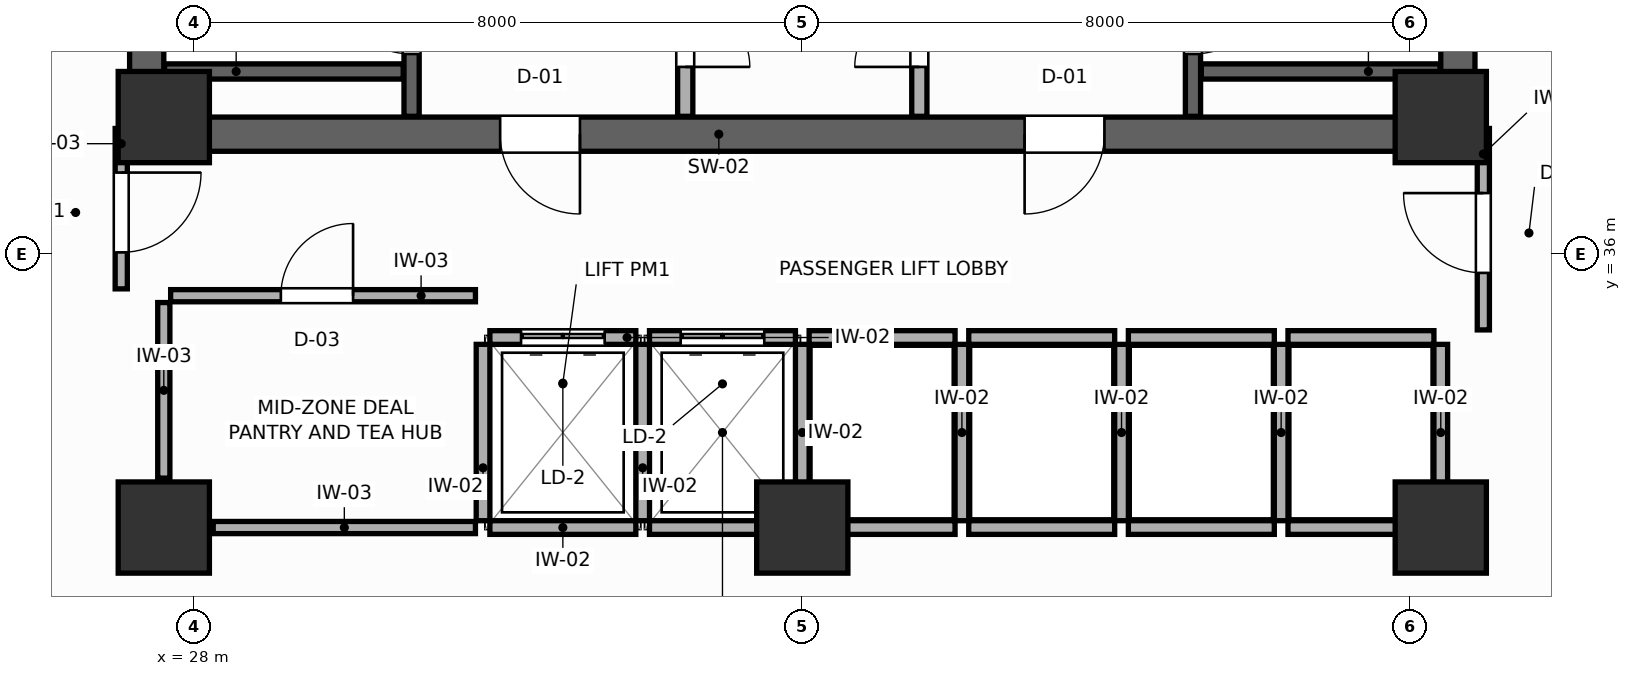
"""IFC4 building model, lengths in metres.
Left out: names, types, materials, properties, quantities, classifications, styles, units other than length and angle.
Written with IfcOpenShell. Run it as: python <this file> out.ifc"""

import sys

from ifc_helpers import new_model, si_unit, direction, frame, frame_2d, origin, origin_2d, place, context, subcontext, project, spatial, rectangle, extrude, source, transform, mapped, element, fill, save


model = new_model("IFC4")
c1 = context("Model", 3, precision=1e-05, world=origin(), true_north=direction((0.0, 1.0)))
c2 = subcontext(c1, "Body", "Model", "MODEL_VIEW")
j1 = project(units=[si_unit("LENGTHUNIT", "METRE"), si_unit("PLANEANGLEUNIT", "RADIAN")], contexts=[c1])
p1 = place(None, origin())
s1 = spatial("IfcSite", under=j1, at=p1, CompositionType="ELEMENT")
p2 = place(p1, origin())
s2 = spatial("IfcBuilding", under=s1, at=p2, CompositionType="ELEMENT")
p3 = place(p2, frame((0.0, 0.0, 120.6)))
s3 = spatial("IfcBuildingStorey", under=s2, at=p3, CompositionType="ELEMENT", Elevation=120.6)
p4 = place(p3, frame((27.15, 37.575, 0.0), z_axis=(0.0, 0.0, 1.0), x_axis=(1.0, 0.0, 0.0)))
e1 = element("IfcWall", 1, at=p4, inside=s3, PredefinedType="SHEAR", context=c2, shape_type="SweptSolid", body=[
    extrude(rectangle(XDim=17.7, YDim=0.45, at=frame_2d((8.85, 0.0))), origin(), (0.0, 0.0, 1.0), 3.6),
])
p5 = place(p4, frame((4.875, 0.0, 0.0)))
e2 = element("IfcOpeningElement", 2, at=p5, cuts=e1, PredefinedType="OPENING", context=c2, shape_type="SweptSolid", body=[
    extrude(rectangle(XDim=1.05, YDim=2.1, at=frame_2d((0.525, 1.05))), frame((0.0, 0.235, 0.0), z_axis=(0.0, -1.0, 0.0), x_axis=(1.0, 0.0, 0.0)), (0.0, 0.0, 1.0), 0.47),
])
p6 = place(p4, frame((11.775, 0.0, 0.0)))
e3 = element("IfcOpeningElement", 3, at=p6, cuts=e1, PredefinedType="OPENING", context=c2, shape_type="SweptSolid", body=[
    extrude(rectangle(XDim=1.05, YDim=2.1, at=frame_2d((0.525, 1.05))), frame((0.0, 0.235, 0.0), z_axis=(0.0, -1.0, 0.0), x_axis=(1.0, 0.0, 0.0)), (0.0, 0.0, 1.0), 0.47),
])
for number, where, z_axis, x_axis in (
    (4, (27.375, 37.8, 0.0), (0.0, 0.0, 1.0), (0.0, 1.0, 0.0)),
    (5, (44.625, 37.8, 0.0), (0.0, 0.0, 1.0), (0.0, 1.0, 0.0)),
):
    element("IfcWall", number, at=place(p3, frame(where, z_axis=z_axis, x_axis=x_axis)), inside=s3, PredefinedType="SHEAR", context=c2, shape_type="SweptSolid", body=[
        extrude(rectangle(XDim=9.0, YDim=0.45, at=frame_2d((4.5, 0.0))), origin(), (0.0, 0.0, 1.0), 3.6),
    ])
m1 = source(origin(), c2, "Body", "SweptSolid", [
    extrude(rectangle(XDim=1.2, YDim=1.2, at=origin_2d()), origin(), (0.0, 0.0, 1.0), 3.6),
])
for number, where, z_axis, x_axis in (
    (6, (27.6, 37.8, 0.0), (0.0, 0.0, 1.0), (1.0, 0.0, 0.0)),
    (7, (44.4, 37.8, 0.0), (0.0, 0.0, 1.0), (1.0, 0.0, 0.0)),
    (8, (27.6, 32.4, 0.0), (0.0, 0.0, 1.0), (1.0, 0.0, 0.0)),
    (9, (44.4, 32.4, 0.0), (0.0, 0.0, 1.0), (1.0, 0.0, 0.0)),
    (10, (36.0, 32.4, 0.0), (0.0, 0.0, 1.0), (1.0, 0.0, 0.0)),
):
    element("IfcColumn", number, at=place(p3, frame(where, z_axis=z_axis, x_axis=x_axis)), inside=s3, PredefinedType="COLUMN", context=c2, shape_type="MappedRepresentation", body=[
        mapped(m1, transform((0.0, 0.0, 0.0), scale=1.0)),
    ])
p7 = place(p3, frame((30.86, 37.81, 0.0), z_axis=(0.0, 0.0, 1.0), x_axis=(0.0, 1.0, 0.0)))
e11 = element("IfcWall", 11, at=p7, inside=s3, PredefinedType="SHEAR", context=c2, shape_type="SweptSolid", body=[
    extrude(rectangle(XDim=8.98, YDim=0.2, at=frame_2d((4.49, 0.0))), origin(), (0.0, 0.0, 1.0), 3.6),
])
p8 = place(p7, frame((0.82, 0.0, 0.0)))
e12 = element("IfcOpeningElement", 12, at=p8, cuts=e11, PredefinedType="OPENING", context=c2, shape_type="SweptSolid", body=[
    extrude(rectangle(XDim=1.05, YDim=2.1, at=frame_2d((0.525, 1.05))), frame((0.0, 0.11, 0.0), z_axis=(0.0, -1.0, 0.0), x_axis=(1.0, 0.0, 0.0)), (0.0, 0.0, 1.0), 0.22),
])
p9 = place(p3, frame((27.61, 38.4, 0.0), z_axis=(0.0, 0.0, 1.0), x_axis=(1.0, 0.0, 0.0)))
e13 = element("IfcWall", 13, at=p9, inside=s3, PredefinedType="SHEAR", context=c2, shape_type="SweptSolid", body=[
    extrude(rectangle(XDim=3.14, YDim=0.2, at=frame_2d((1.57, 0.0))), origin(), (0.0, 0.0, 1.0), 3.6),
])
p10 = place(p3, frame((41.14, 37.81, 0.0), z_axis=(0.0, 0.0, 1.0), x_axis=(0.0, 1.0, 0.0)))
e14 = element("IfcWall", 14, at=p10, inside=s3, PredefinedType="SHEAR", context=c2, shape_type="SweptSolid", body=[
    extrude(rectangle(XDim=8.98, YDim=0.2, at=frame_2d((4.49, 0.0))), origin(), (0.0, 0.0, 1.0), 3.6),
])
p11 = place(p10, frame((0.82, 0.0, 0.0)))
e15 = element("IfcOpeningElement", 15, at=p11, cuts=e14, PredefinedType="OPENING", context=c2, shape_type="SweptSolid", body=[
    extrude(rectangle(XDim=1.05, YDim=2.1, at=frame_2d((0.525, 1.05))), frame((0.0, 0.11, 0.0), z_axis=(0.0, -1.0, 0.0), x_axis=(1.0, 0.0, 0.0)), (0.0, 0.0, 1.0), 0.22),
])
p12 = place(p3, frame((41.25, 38.4, 0.0), z_axis=(0.0, 0.0, 1.0), x_axis=(1.0, 0.0, 0.0)))
e16 = element("IfcWall", 16, at=p12, inside=s3, PredefinedType="SHEAR", context=c2, shape_type="SweptSolid", body=[
    extrude(rectangle(XDim=3.14, YDim=0.2, at=frame_2d((1.57, 0.0))), origin(), (0.0, 0.0, 1.0), 3.6),
])
p13 = place(p3, frame((34.46, 37.81, 0.0), z_axis=(0.0, 0.0, 1.0), x_axis=(0.0, 1.0, 0.0)))
e17 = element("IfcWall", 17, at=p13, inside=s3, PredefinedType="PARTITIONING", context=c2, shape_type="SweptSolid", body=[
    extrude(rectangle(XDim=8.98, YDim=0.2, at=frame_2d((4.49, 0.0))), origin(), (0.0, 0.0, 1.0), 3.4),
])
p14 = place(p13, frame((0.65, 0.0, 0.0)))
e18 = element("IfcOpeningElement", 18, at=p14, cuts=e17, PredefinedType="OPENING", context=c2, shape_type="SweptSolid", body=[
    extrude(rectangle(XDim=0.85, YDim=2.05, at=frame_2d((0.425, 1.025))), frame((0.0, 0.11, 0.0), z_axis=(0.0, -1.0, 0.0), x_axis=(1.0, 0.0, 0.0)), (0.0, 0.0, 1.0), 0.22),
])
p15 = place(p3, frame((37.54, 37.81, 0.0), z_axis=(0.0, 0.0, 1.0), x_axis=(0.0, 1.0, 0.0)))
e19 = element("IfcWall", 19, at=p15, inside=s3, PredefinedType="PARTITIONING", context=c2, shape_type="SweptSolid", body=[
    extrude(rectangle(XDim=8.98, YDim=0.2, at=frame_2d((4.49, 0.0))), origin(), (0.0, 0.0, 1.0), 3.4),
])
p16 = place(p15, frame((0.65, 0.0, 0.0)))
e20 = element("IfcOpeningElement", 20, at=p16, cuts=e19, PredefinedType="OPENING", context=c2, shape_type="SweptSolid", body=[
    extrude(rectangle(XDim=0.85, YDim=2.05, at=frame_2d((0.425, 1.025))), frame((0.0, 0.11, 0.0), z_axis=(0.0, -1.0, 0.0), x_axis=(1.0, 0.0, 0.0)), (0.0, 0.0, 1.0), 0.22),
])
p17 = place(p3, frame((31.89, 34.9, 0.0), z_axis=(0.0, 0.0, 1.0), x_axis=(1.0, 0.0, 0.0)))
e21 = element("IfcWall", 21, at=p17, inside=s3, PredefinedType="PARTITIONING", context=c2, shape_type="SweptSolid", body=[
    extrude(rectangle(XDim=1.92, YDim=0.18, at=frame_2d((0.96, 0.0))), origin(), (0.0, 0.0, 1.0), 3.4),
])
p18 = place(p17, frame((0.41, 0.0, 0.0)))
e22 = element("IfcOpeningElement", 22, at=p18, cuts=e21, PredefinedType="OPENING", context=c2, shape_type="SweptSolid", body=[
    extrude(rectangle(XDim=1.1, YDim=2.1, at=frame_2d((0.55, 1.05))), frame((0.0, 0.1, 0.0), z_axis=(0.0, -1.0, 0.0), x_axis=(1.0, 0.0, 0.0)), (0.0, 0.0, 1.0), 0.2),
])
p19 = place(p3, frame((31.89, 32.4, 0.0), z_axis=(0.0, 0.0, 1.0), x_axis=(1.0, 0.0, 0.0)))
e23 = element("IfcWall", 23, at=p19, inside=s3, PredefinedType="PARTITIONING", context=c2, shape_type="SweptSolid", body=[
    extrude(rectangle(XDim=1.92, YDim=0.18, at=frame_2d((0.96, 0.0))), origin(), (0.0, 0.0, 1.0), 2.95),
])
p20 = place(p3, frame((31.8, 32.49, 0.0), z_axis=(0.0, 0.0, 1.0), x_axis=(0.0, 1.0, 0.0)))
e24 = element("IfcWall", 24, at=p20, inside=s3, PredefinedType="PARTITIONING", context=c2, shape_type="SweptSolid", body=[
    extrude(rectangle(XDim=2.32, YDim=0.18, at=frame_2d((1.16, 0.0))), origin(), (0.0, 0.0, 1.0), 3.4),
])
p21 = place(p3, frame((33.99, 34.9, 0.0), z_axis=(0.0, 0.0, 1.0), x_axis=(1.0, 0.0, 0.0)))
e25 = element("IfcWall", 25, at=p21, inside=s3, PredefinedType="PARTITIONING", context=c2, shape_type="SweptSolid", body=[
    extrude(rectangle(XDim=1.92, YDim=0.18, at=frame_2d((0.96, 0.0))), origin(), (0.0, 0.0, 1.0), 3.4),
])
p22 = place(p21, frame((0.41, 0.0, 0.0)))
e26 = element("IfcOpeningElement", 26, at=p22, cuts=e25, PredefinedType="OPENING", context=c2, shape_type="SweptSolid", body=[
    extrude(rectangle(XDim=1.1, YDim=2.1, at=frame_2d((0.55, 1.05))), frame((0.0, 0.1, 0.0), z_axis=(0.0, -1.0, 0.0), x_axis=(1.0, 0.0, 0.0)), (0.0, 0.0, 1.0), 0.2),
])
p23 = place(p3, frame((33.99, 32.4, 0.0), z_axis=(0.0, 0.0, 1.0), x_axis=(1.0, 0.0, 0.0)))
e27 = element("IfcWall", 27, at=p23, inside=s3, PredefinedType="PARTITIONING", context=c2, shape_type="SweptSolid", body=[
    extrude(rectangle(XDim=1.92, YDim=0.18, at=frame_2d((0.96, 0.0))), origin(), (0.0, 0.0, 1.0), 2.95),
])
p24 = place(p3, frame((33.9, 32.49, 0.0), z_axis=(0.0, 0.0, 1.0), x_axis=(0.0, 1.0, 0.0)))
e28 = element("IfcWall", 28, at=p24, inside=s3, PredefinedType="PARTITIONING", context=c2, shape_type="SweptSolid", body=[
    extrude(rectangle(XDim=2.32, YDim=0.18, at=frame_2d((1.16, 0.0))), origin(), (0.0, 0.0, 1.0), 3.4),
])
p25 = place(p3, frame((36.09, 34.9, 0.0), z_axis=(0.0, 0.0, 1.0), x_axis=(1.0, 0.0, 0.0)))
e29 = element("IfcWall", 29, at=p25, inside=s3, PredefinedType="PARTITIONING", context=c2, shape_type="SweptSolid", body=[
    extrude(rectangle(XDim=1.92, YDim=0.18, at=frame_2d((0.96, 0.0))), origin(), (0.0, 0.0, 1.0), 3.4),
])
p26 = place(p3, frame((36.09, 32.4, 0.0), z_axis=(0.0, 0.0, 1.0), x_axis=(1.0, 0.0, 0.0)))
e30 = element("IfcWall", 30, at=p26, inside=s3, PredefinedType="PARTITIONING", context=c2, shape_type="SweptSolid", body=[
    extrude(rectangle(XDim=1.92, YDim=0.18, at=frame_2d((0.96, 0.0))), origin(), (0.0, 0.0, 1.0), 2.95),
])
p27 = place(p3, frame((36.0, 32.49, 0.0), z_axis=(0.0, 0.0, 1.0), x_axis=(0.0, 1.0, 0.0)))
e31 = element("IfcWall", 31, at=p27, inside=s3, PredefinedType="PARTITIONING", context=c2, shape_type="SweptSolid", body=[
    extrude(rectangle(XDim=2.32, YDim=0.18, at=frame_2d((1.16, 0.0))), origin(), (0.0, 0.0, 1.0), 3.4),
])
p28 = place(p3, frame((38.19, 34.9, 0.0), z_axis=(0.0, 0.0, 1.0), x_axis=(1.0, 0.0, 0.0)))
e32 = element("IfcWall", 32, at=p28, inside=s3, PredefinedType="PARTITIONING", context=c2, shape_type="SweptSolid", body=[
    extrude(rectangle(XDim=1.92, YDim=0.18, at=frame_2d((0.96, 0.0))), origin(), (0.0, 0.0, 1.0), 3.4),
])
p29 = place(p3, frame((38.19, 32.4, 0.0), z_axis=(0.0, 0.0, 1.0), x_axis=(1.0, 0.0, 0.0)))
e33 = element("IfcWall", 33, at=p29, inside=s3, PredefinedType="PARTITIONING", context=c2, shape_type="SweptSolid", body=[
    extrude(rectangle(XDim=1.92, YDim=0.18, at=frame_2d((0.96, 0.0))), origin(), (0.0, 0.0, 1.0), 2.95),
])
p30 = place(p3, frame((38.1, 32.49, 0.0), z_axis=(0.0, 0.0, 1.0), x_axis=(0.0, 1.0, 0.0)))
e34 = element("IfcWall", 34, at=p30, inside=s3, PredefinedType="PARTITIONING", context=c2, shape_type="SweptSolid", body=[
    extrude(rectangle(XDim=2.32, YDim=0.18, at=frame_2d((1.16, 0.0))), origin(), (0.0, 0.0, 1.0), 3.4),
])
p31 = place(p3, frame((40.29, 34.9, 0.0), z_axis=(0.0, 0.0, 1.0), x_axis=(1.0, 0.0, 0.0)))
e35 = element("IfcWall", 35, at=p31, inside=s3, PredefinedType="PARTITIONING", context=c2, shape_type="SweptSolid", body=[
    extrude(rectangle(XDim=1.92, YDim=0.18, at=frame_2d((0.96, 0.0))), origin(), (0.0, 0.0, 1.0), 3.4),
])
p32 = place(p3, frame((40.29, 32.4, 0.0), z_axis=(0.0, 0.0, 1.0), x_axis=(1.0, 0.0, 0.0)))
e36 = element("IfcWall", 36, at=p32, inside=s3, PredefinedType="PARTITIONING", context=c2, shape_type="SweptSolid", body=[
    extrude(rectangle(XDim=1.92, YDim=0.18, at=frame_2d((0.96, 0.0))), origin(), (0.0, 0.0, 1.0), 2.95),
])
p33 = place(p3, frame((40.2, 32.49, 0.0), z_axis=(0.0, 0.0, 1.0), x_axis=(0.0, 1.0, 0.0)))
e37 = element("IfcWall", 37, at=p33, inside=s3, PredefinedType="PARTITIONING", context=c2, shape_type="SweptSolid", body=[
    extrude(rectangle(XDim=2.32, YDim=0.18, at=frame_2d((1.16, 0.0))), origin(), (0.0, 0.0, 1.0), 3.4),
])
p34 = place(p3, frame((42.39, 34.9, 0.0), z_axis=(0.0, 0.0, 1.0), x_axis=(1.0, 0.0, 0.0)))
e38 = element("IfcWall", 38, at=p34, inside=s3, PredefinedType="PARTITIONING", context=c2, shape_type="SweptSolid", body=[
    extrude(rectangle(XDim=1.92, YDim=0.18, at=frame_2d((0.96, 0.0))), origin(), (0.0, 0.0, 1.0), 3.4),
])
p35 = place(p3, frame((42.39, 32.4, 0.0), z_axis=(0.0, 0.0, 1.0), x_axis=(1.0, 0.0, 0.0)))
e39 = element("IfcWall", 39, at=p35, inside=s3, PredefinedType="PARTITIONING", context=c2, shape_type="SweptSolid", body=[
    extrude(rectangle(XDim=1.92, YDim=0.18, at=frame_2d((0.96, 0.0))), origin(), (0.0, 0.0, 1.0), 2.95),
])
for number, where, z_axis, x_axis in (
    (40, (42.3, 32.49, 0.0), (0.0, 0.0, 1.0), (0.0, 1.0, 0.0)),
    (41, (44.4, 32.49, 0.0), (0.0, 0.0, 1.0), (0.0, 1.0, 0.0)),
):
    element("IfcWall", number, at=place(p3, frame(where, z_axis=z_axis, x_axis=x_axis)), inside=s3, PredefinedType="PARTITIONING", context=c2, shape_type="SweptSolid", body=[
        extrude(rectangle(XDim=2.32, YDim=0.18, at=frame_2d((1.16, 0.0))), origin(), (0.0, 0.0, 1.0), 3.4),
    ])
p36 = place(p3, frame((28.25, 32.4, 0.0), z_axis=(0.0, 0.0, 1.0), x_axis=(1.0, 0.0, 0.0)))
e42 = element("IfcWall", 42, at=p36, inside=s3, PredefinedType="PARTITIONING", context=c2, shape_type="SweptSolid", body=[
    extrude(rectangle(XDim=3.45, YDim=0.16, at=frame_2d((1.725, 0.0))), origin(), (0.0, 0.0, 1.0), 2.95),
])
p37 = place(p3, frame((27.6, 33.05, 0.0), z_axis=(0.0, 0.0, 1.0), x_axis=(0.0, 1.0, 0.0)))
e43 = element("IfcWall", 43, at=p37, inside=s3, PredefinedType="PARTITIONING", context=c2, shape_type="SweptSolid", body=[
    extrude(rectangle(XDim=2.31, YDim=0.16, at=frame_2d((1.155, 0.0))), origin(), (0.0, 0.0, 1.0), 3.4),
])
p38 = place(p3, frame((27.69, 35.45, 0.0), z_axis=(0.0, 0.0, 1.0), x_axis=(1.0, 0.0, 0.0)))
e44 = element("IfcWall", 44, at=p38, inside=s3, PredefinedType="PARTITIONING", context=c2, shape_type="SweptSolid", body=[
    extrude(rectangle(XDim=4.01, YDim=0.16, at=frame_2d((2.005, 0.0))), origin(), (0.0, 0.0, 1.0), 3.4),
])
p39 = place(p38, frame((1.45, 0.0, 0.0)))
e45 = element("IfcOpeningElement", 45, at=p39, cuts=e44, PredefinedType="OPENING", context=c2, shape_type="SweptSolid", body=[
    extrude(rectangle(XDim=0.95, YDim=2.05, at=frame_2d((0.475, 1.025))), frame((0.0, 0.09, 0.0), z_axis=(0.0, -1.0, 0.0), x_axis=(1.0, 0.0, 0.0)), (0.0, 0.0, 1.0), 0.18),
])
p40 = place(p3, frame((27.04, 35.54, 0.0), z_axis=(0.0, 0.0, 1.0), x_axis=(0.0, 1.0, 0.0)))
e46 = element("IfcWall", 46, at=p40, inside=s3, PredefinedType="PARTITIONING", context=c2, shape_type="SweptSolid", body=[
    extrude(rectangle(XDim=2.11, YDim=0.16, at=frame_2d((1.055, 0.0))), origin(), (0.0, 0.0, 1.0), 3.4),
])
p41 = place(p40, frame((0.48, 0.0, 0.0)))
e47 = element("IfcOpeningElement", 47, at=p41, cuts=e46, PredefinedType="OPENING", context=c2, shape_type="SweptSolid", body=[
    extrude(rectangle(XDim=1.05, YDim=2.1, at=frame_2d((0.525, 1.05))), frame((0.0, 0.09, 0.0), z_axis=(0.0, -1.0, 0.0), x_axis=(1.0, 0.0, 0.0)), (0.0, 0.0, 1.0), 0.18),
])
p42 = place(p3, frame((44.96, 35.0, 0.0), z_axis=(0.0, 0.0, 1.0), x_axis=(0.0, 1.0, 0.0)))
e48 = element("IfcWall", 48, at=p42, inside=s3, PredefinedType="PARTITIONING", context=c2, shape_type="SweptSolid", body=[
    extrude(rectangle(XDim=2.65, YDim=0.16, at=frame_2d((1.325, 0.0))), origin(), (0.0, 0.0, 1.0), 3.4),
])
p43 = place(p42, frame((0.75, 0.0, 0.0)))
e49 = element("IfcOpeningElement", 49, at=p43, cuts=e48, PredefinedType="OPENING", context=c2, shape_type="SweptSolid", body=[
    extrude(rectangle(XDim=1.05, YDim=2.1, at=frame_2d((0.525, 1.05))), frame((0.0, 0.09, 0.0), z_axis=(0.0, -1.0, 0.0), x_axis=(1.0, 0.0, 0.0)), (0.0, 0.0, 1.0), 0.18),
])
p44 = place(p8, origin())
e50 = element("IfcDoor", 50, at=p44, inside=s3, OperationType="SINGLE_SWING_RIGHT", PredefinedType="DOOR", context=c2, shape_type="SweptSolid", body=[
    extrude(rectangle(XDim=1.05, YDim=2.1, at=frame_2d((0.525, 1.05))), frame((0.0, 0.025, 0.0), z_axis=(0.0, -1.0, 0.0), x_axis=(1.0, 0.0, 0.0)), (0.0, 0.0, 1.0), 0.05),
])
fill(e12, e50)
p45 = place(p11, frame((1.05, 0.0, 0.0), z_axis=(0.0, 0.0, 1.0), x_axis=(-1.0, 0.0, 0.0)))
e51 = element("IfcDoor", 51, at=p45, inside=s3, OperationType="SINGLE_SWING_LEFT", PredefinedType="DOOR", context=c2, shape_type="SweptSolid", body=[
    extrude(rectangle(XDim=1.05, YDim=2.1, at=frame_2d((0.525, 1.05))), frame((0.0, 0.025, 0.0), z_axis=(0.0, -1.0, 0.0), x_axis=(1.0, 0.0, 0.0)), (0.0, 0.0, 1.0), 0.05),
])
fill(e15, e51)
p46 = place(p14, frame((0.85, 0.0, 0.0), z_axis=(0.0, 0.0, 1.0), x_axis=(-1.0, 0.0, 0.0)))
e52 = element("IfcDoor", 52, at=p46, inside=s3, OperationType="SINGLE_SWING_RIGHT", PredefinedType="DOOR", context=c2, shape_type="SweptSolid", body=[
    extrude(rectangle(XDim=0.85, YDim=2.05, at=frame_2d((0.425, 1.025))), frame((0.0, 0.025, 0.0), z_axis=(0.0, -1.0, 0.0), x_axis=(1.0, 0.0, 0.0)), (0.0, 0.0, 1.0), 0.05),
])
fill(e18, e52)
p47 = place(p16, origin())
e53 = element("IfcDoor", 53, at=p47, inside=s3, OperationType="SINGLE_SWING_LEFT", PredefinedType="DOOR", context=c2, shape_type="SweptSolid", body=[
    extrude(rectangle(XDim=0.85, YDim=2.05, at=frame_2d((0.425, 1.025))), frame((0.0, 0.025, 0.0), z_axis=(0.0, -1.0, 0.0), x_axis=(1.0, 0.0, 0.0)), (0.0, 0.0, 1.0), 0.05),
])
fill(e20, e53)
p48 = place(p18, origin())
e54 = element("IfcDoor", 54, at=p48, inside=s3, OperationType="DOUBLE_DOOR_SLIDING", PredefinedType="DOOR", context=c2, shape_type="SweptSolid", body=[
    extrude(rectangle(XDim=1.1, YDim=2.1, at=frame_2d((0.55, 1.05))), frame((0.0, 0.025, 0.0), z_axis=(0.0, -1.0, 0.0), x_axis=(1.0, 0.0, 0.0)), (0.0, 0.0, 1.0), 0.05),
])
fill(e22, e54)
p49 = place(p22, origin())
e55 = element("IfcDoor", 55, at=p49, inside=s3, OperationType="DOUBLE_DOOR_SLIDING", PredefinedType="DOOR", context=c2, shape_type="SweptSolid", body=[
    extrude(rectangle(XDim=1.1, YDim=2.1, at=frame_2d((0.55, 1.05))), frame((0.0, 0.025, 0.0), z_axis=(0.0, -1.0, 0.0), x_axis=(1.0, 0.0, 0.0)), (0.0, 0.0, 1.0), 0.05),
])
fill(e26, e55)
p50 = place(p39, origin())
e56 = element("IfcDoor", 56, at=p50, inside=s3, OperationType="SINGLE_SWING_RIGHT", PredefinedType="DOOR", context=c2, shape_type="SweptSolid", body=[
    extrude(rectangle(XDim=0.95, YDim=2.05, at=frame_2d((0.475, 1.025))), frame((0.0, 0.025, 0.0), z_axis=(0.0, -1.0, 0.0), x_axis=(1.0, 0.0, 0.0)), (0.0, 0.0, 1.0), 0.05),
])
fill(e45, e56)
p51 = place(p41, frame((1.05, 0.0, 0.0), z_axis=(0.0, 0.0, 1.0), x_axis=(-1.0, 0.0, 0.0)))
e57 = element("IfcDoor", 57, at=p51, inside=s3, OperationType="SINGLE_SWING_LEFT", PredefinedType="DOOR", context=c2, shape_type="SweptSolid", body=[
    extrude(rectangle(XDim=1.05, YDim=2.1, at=frame_2d((0.525, 1.05))), frame((0.0, 0.025, 0.0), z_axis=(0.0, -1.0, 0.0), x_axis=(1.0, 0.0, 0.0)), (0.0, 0.0, 1.0), 0.05),
])
fill(e47, e57)
p52 = place(p43, origin())
e58 = element("IfcDoor", 58, at=p52, inside=s3, OperationType="SINGLE_SWING_RIGHT", PredefinedType="DOOR", context=c2, shape_type="SweptSolid", body=[
    extrude(rectangle(XDim=1.05, YDim=2.1, at=frame_2d((0.525, 1.05))), frame((0.0, 0.025, 0.0), z_axis=(0.0, -1.0, 0.0), x_axis=(1.0, 0.0, 0.0)), (0.0, 0.0, 1.0), 0.05),
])
fill(e49, e58)
p53 = place(p5, frame((1.05, 0.0, 0.0), z_axis=(0.0, 0.0, 1.0), x_axis=(-1.0, 0.0, 0.0)))
e59 = element("IfcDoor", 59, at=p53, inside=s3, OperationType="SINGLE_SWING_LEFT", PredefinedType="DOOR", context=c2, shape_type="SweptSolid", body=[
    extrude(rectangle(XDim=1.05, YDim=2.1, at=frame_2d((0.525, 1.05))), frame((0.0, 0.025, 0.0), z_axis=(0.0, -1.0, 0.0), x_axis=(1.0, 0.0, 0.0)), (0.0, 0.0, 1.0), 0.05),
])
fill(e2, e59)
p54 = place(p6, frame((1.05, 0.0, 0.0), z_axis=(0.0, 0.0, 1.0), x_axis=(-1.0, 0.0, 0.0)))
e60 = element("IfcDoor", 60, at=p54, inside=s3, OperationType="SINGLE_SWING_RIGHT", PredefinedType="DOOR", context=c2, shape_type="SweptSolid", body=[
    extrude(rectangle(XDim=1.05, YDim=2.1, at=frame_2d((0.525, 1.05))), frame((0.0, 0.025, 0.0), z_axis=(0.0, -1.0, 0.0), x_axis=(1.0, 0.0, 0.0)), (0.0, 0.0, 1.0), 0.05),
])
fill(e3, e60)
save(model, sys.argv[1])
